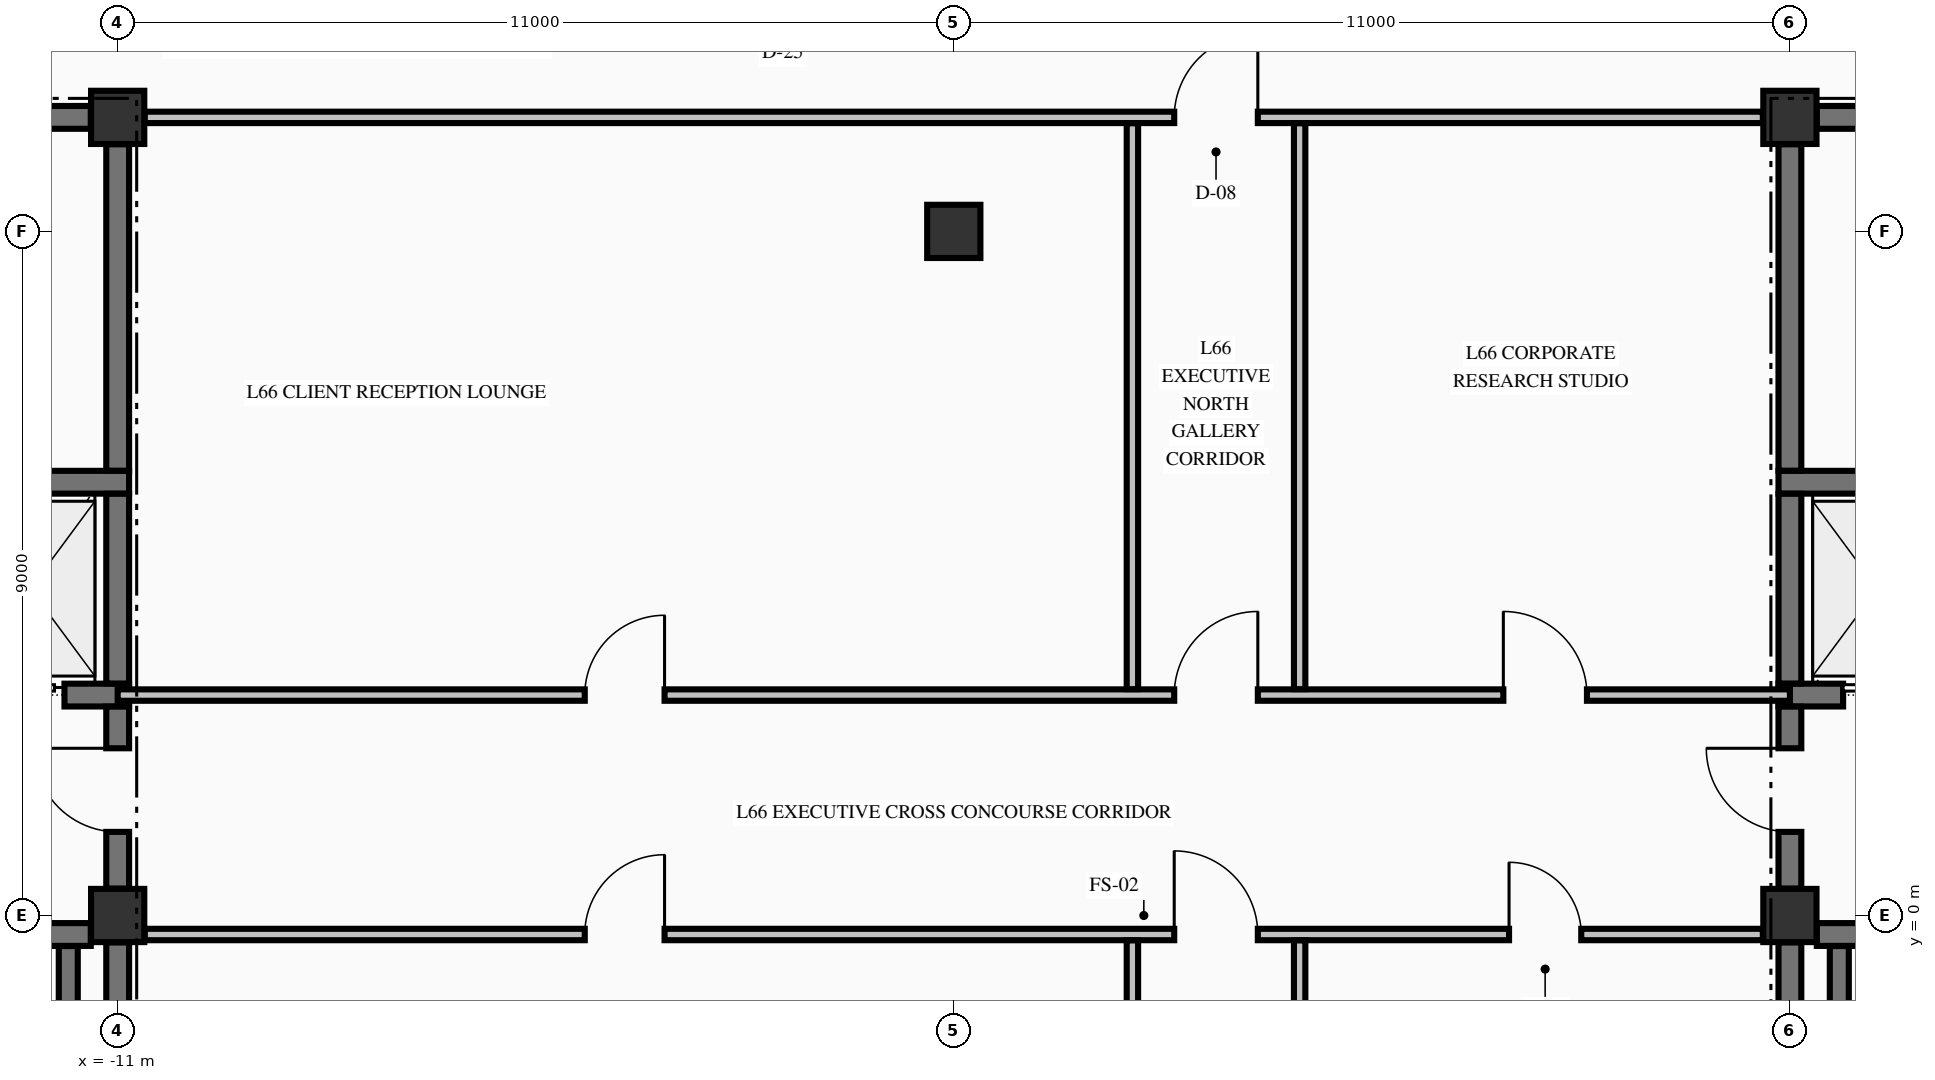
"""IFC4 building model, lengths in metres.
Left out: names, types, materials, properties, quantities, classifications, styles, units other than length and angle.
Written with IfcOpenShell. Run it as: python <this file> out.ifc"""

import sys

from ifc_helpers import new_model, si_unit, direction, frame, frame_2d, origin, origin_2d, place, context, subcontext, project, spatial, rectangle, extrude, element, fill, save


model = new_model("IFC4")
c1 = context("Model", 3, precision=1e-05, world=origin(), true_north=direction((0.0, 1.0)))
c2 = subcontext(c1, "Body", "Model", "MODEL_VIEW")
j1 = project(units=[si_unit("LENGTHUNIT", "METRE"), si_unit("PLANEANGLEUNIT", "RADIAN")], contexts=[c1])
p1 = place(None, origin())
s1 = spatial("IfcSite", under=j1, at=p1, CompositionType="ELEMENT")
p2 = place(p1, origin())
s2 = spatial("IfcBuilding", under=s1, at=p2, CompositionType="ELEMENT")
p3 = place(p2, frame((0.0, 0.0, 249.43)))
s3 = spatial("IfcBuildingStorey", under=s2, at=p3, CompositionType="ELEMENT", Elevation=249.43)
for number, where, z_axis, x_axis in (
    (1, (-11.0, 0.0, -0.425), (0.0, 0.0, 1.0), (1.0, 0.0, 0.0)),
    (2, (-11.0, 10.5, -0.425), (0.0, 0.0, 1.0), (1.0, 0.0, 0.0)),
    (3, (11.0, 0.0, -0.425), (0.0, 0.0, 1.0), (1.0, 0.0, 0.0)),
    (4, (11.0, 10.5, -0.425), (0.0, 0.0, 1.0), (1.0, 0.0, 0.0)),
    (5, (0.0, 9.0, -0.425), (0.0, 0.0, 1.0), (1.0, 0.0, 0.0)),
):
    element("IfcColumn", number, at=place(p3, frame(where, z_axis=z_axis, x_axis=x_axis)), inside=s3, PredefinedType="COLUMN", context=c2, shape_type="SweptSolid", body=[
        extrude(rectangle(XDim=0.7, YDim=0.7, at=origin_2d()), origin(), (0.0, 0.0, 1.0), 5.0),
    ])
p4 = place(p3, frame((-20.571, -0.25, 0.0), z_axis=(0.0, 0.0, 1.0), x_axis=(1.0, 0.0, 0.0)))
e6 = element("IfcWall", 6, at=p4, inside=s3, PredefinedType="SHEAR", context=c2, shape_type="SweptSolid", body=[
    extrude(rectangle(XDim=9.217, YDim=0.3, at=frame_2d((4.608, 0.0))), origin(), (0.0, 0.0, 1.0), 4.575),
])
p5 = place(p4, frame((6.871, 0.0, 0.0)))
e7 = element("IfcOpeningElement", 7, at=p5, cuts=e6, PredefinedType="OPENING", context=c2, shape_type="SweptSolid", body=[
    extrude(rectangle(XDim=1.1, YDim=2.15, at=frame_2d((0.55, 1.075))), frame((0.0, 0.16, 0.0), z_axis=(0.0, -1.0, 0.0), x_axis=(1.0, 0.0, 0.0)), (0.0, 0.0, 1.0), 0.32),
])
p6 = place(p3, frame((11.354, -0.25, 0.0), z_axis=(0.0, 0.0, 1.0), x_axis=(1.0, 0.0, 0.0)))
e8 = element("IfcWall", 8, at=p6, inside=s3, PredefinedType="SHEAR", context=c2, shape_type="SweptSolid", body=[
    extrude(rectangle(XDim=3.521, YDim=0.3, at=frame_2d((1.76, 0.0))), origin(), (0.0, 0.0, 1.0), 4.575),
])
p7 = place(p6, frame((1.246, 0.0, 0.0)))
e9 = element("IfcOpeningElement", 9, at=p7, cuts=e8, PredefinedType="OPENING", context=c2, shape_type="SweptSolid", body=[
    extrude(rectangle(XDim=1.1, YDim=2.15, at=frame_2d((0.55, 1.075))), frame((0.0, 0.16, 0.0), z_axis=(0.0, -1.0, 0.0), x_axis=(1.0, 0.0, 0.0)), (0.0, 0.0, 1.0), 0.32),
])
p8 = place(p3, frame((-14.875, 2.9, 0.0), z_axis=(0.0, 0.0, 1.0), x_axis=(1.0, 0.0, 0.0)))
e10 = element("IfcWall", 10, at=p8, inside=s3, PredefinedType="SHEAR", context=c2, shape_type="SweptSolid", body=[
    extrude(rectangle(XDim=4.025, YDim=0.3, at=frame_2d((2.012, 0.0))), origin(), (0.0, 0.0, 1.0), 4.575),
])
p9 = place(p8, frame((2.075, 0.0, 0.0)))
e11 = element("IfcOpeningElement", 11, at=p9, cuts=e10, PredefinedType="OPENING", context=c2, shape_type="SweptSolid", body=[
    extrude(rectangle(XDim=1.1, YDim=2.2, at=frame_2d((0.55, 1.1))), frame((0.0, 0.16, 0.0), z_axis=(0.0, -1.0, 0.0), x_axis=(1.0, 0.0, 0.0)), (0.0, 0.0, 1.0), 0.32),
])
p10 = place(p3, frame((10.85, 2.9, 0.0), z_axis=(0.0, 0.0, 1.0), x_axis=(1.0, 0.0, 0.0)))
e12 = element("IfcWall", 12, at=p10, inside=s3, PredefinedType="SHEAR", context=c2, shape_type="SweptSolid", body=[
    extrude(rectangle(XDim=4.025, YDim=0.3, at=frame_2d((2.012, 0.0))), origin(), (0.0, 0.0, 1.0), 4.575),
])
p11 = place(p10, frame((0.85, 0.0, 0.0)))
e13 = element("IfcOpeningElement", 13, at=p11, cuts=e12, PredefinedType="OPENING", context=c2, shape_type="SweptSolid", body=[
    extrude(rectangle(XDim=1.1, YDim=2.2, at=frame_2d((0.55, 1.1))), frame((0.0, 0.16, 0.0), z_axis=(0.0, -1.0, 0.0), x_axis=(1.0, 0.0, 0.0)), (0.0, 0.0, 1.0), 0.32),
])
for number, where, z_axis, x_axis in (
    (14, (-14.875, 5.7, 0.0), (0.0, 0.0, 1.0), (1.0, 0.0, 0.0)),
    (15, (10.85, 5.7, 0.0), (0.0, 0.0, 1.0), (1.0, 0.0, 0.0)),
):
    element("IfcWall", number, at=place(p3, frame(where, z_axis=z_axis, x_axis=x_axis)), inside=s3, PredefinedType="SHEAR", context=c2, shape_type="SweptSolid", body=[
        extrude(rectangle(XDim=4.025, YDim=0.3, at=frame_2d((2.012, 0.0))), origin(), (0.0, 0.0, 1.0), 4.575),
    ])
p12 = place(p3, frame((-14.7, 10.5, 0.0), z_axis=(0.0, 0.0, 1.0), x_axis=(1.0, 0.0, 0.0)))
e16 = element("IfcWall", 16, at=p12, inside=s3, PredefinedType="SHEAR", context=c2, shape_type="SweptSolid", body=[
    extrude(rectangle(XDim=3.346, YDim=0.3, at=frame_2d((1.673, 0.0))), origin(), (0.0, 0.0, 1.0), 4.575),
])
p13 = place(p12, frame((0.775, 0.0, 0.0)))
e17 = element("IfcOpeningElement", 17, at=p13, cuts=e16, PredefinedType="OPENING", context=c2, shape_type="SweptSolid", body=[
    extrude(rectangle(XDim=0.95, YDim=2.15, at=frame_2d((0.475, 1.075))), frame((0.0, 0.16, 0.0), z_axis=(0.0, -1.0, 0.0), x_axis=(1.0, 0.0, 0.0)), (0.0, 0.0, 1.0), 0.32),
])
p14 = place(p3, frame((11.354, 10.5, 0.0), z_axis=(0.0, 0.0, 1.0), x_axis=(1.0, 0.0, 0.0)))
e18 = element("IfcWall", 18, at=p14, inside=s3, PredefinedType="SHEAR", context=c2, shape_type="SweptSolid", body=[
    extrude(rectangle(XDim=3.346, YDim=0.3, at=frame_2d((1.673, 0.0))), origin(), (0.0, 0.0, 1.0), 4.575),
])
p15 = place(p14, frame((1.621, 0.0, 0.0)))
e19 = element("IfcOpeningElement", 19, at=p15, cuts=e18, PredefinedType="OPENING", context=c2, shape_type="SweptSolid", body=[
    extrude(rectangle(XDim=0.95, YDim=2.15, at=frame_2d((0.475, 1.075))), frame((0.0, 0.16, 0.0), z_axis=(0.0, -1.0, 0.0), x_axis=(1.0, 0.0, 0.0)), (0.0, 0.0, 1.0), 0.32),
])
p16 = place(p3, frame((-10.644, -0.25, 0.0), z_axis=(0.0, 0.0, 1.0), x_axis=(1.0, 0.0, 0.0)))
e20 = element("IfcWall", 20, at=p16, inside=s3, PredefinedType="PARTITIONING", context=c2, shape_type="SweptSolid", body=[
    extrude(rectangle(XDim=21.288, YDim=0.15, at=frame_2d((10.644, 0.0))), origin(), (0.0, 0.0, 1.0), 4.575),
])
p17 = place(p16, frame((13.544, 0.0, 0.0)))
e21 = element("IfcOpeningElement", 21, at=p17, cuts=e20, PredefinedType="OPENING", context=c2, shape_type="SweptSolid", body=[
    extrude(rectangle(XDim=1.1, YDim=2.15, at=frame_2d((0.55, 1.075))), frame((0.0, 0.085, 0.0), z_axis=(0.0, -1.0, 0.0), x_axis=(1.0, 0.0, 0.0)), (0.0, 0.0, 1.0), 0.17),
])
p18 = place(p16, frame((5.789, 0.0, 0.0)))
e22 = element("IfcOpeningElement", 22, at=p18, cuts=e20, PredefinedType="OPENING", context=c2, shape_type="SweptSolid", body=[
    extrude(rectangle(XDim=1.05, YDim=2.15, at=frame_2d((0.525, 1.075))), frame((0.0, 0.085, 0.0), z_axis=(0.0, -1.0, 0.0), x_axis=(1.0, 0.0, 0.0)), (0.0, 0.0, 1.0), 0.17),
])
p19 = place(p16, frame((17.949, 0.0, 0.0)))
e23 = element("IfcOpeningElement", 23, at=p19, cuts=e20, PredefinedType="OPENING", context=c2, shape_type="SweptSolid", body=[
    extrude(rectangle(XDim=0.95, YDim=2.15, at=frame_2d((0.475, 1.075))), frame((0.0, 0.085, 0.0), z_axis=(0.0, -1.0, 0.0), x_axis=(1.0, 0.0, 0.0)), (0.0, 0.0, 1.0), 0.17),
])
p20 = place(p3, frame((-11.0, 2.9, 0.0), z_axis=(0.0, 0.0, 1.0), x_axis=(1.0, 0.0, 0.0)))
e24 = element("IfcWall", 24, at=p20, inside=s3, PredefinedType="PARTITIONING", context=c2, shape_type="SweptSolid", body=[
    extrude(rectangle(XDim=22.0, YDim=0.15, at=frame_2d((11.0, 0.0))), origin(), (0.0, 0.0, 1.0), 4.575),
])
p21 = place(p20, frame((13.9, 0.0, 0.0)))
e25 = element("IfcOpeningElement", 25, at=p21, cuts=e24, PredefinedType="OPENING", context=c2, shape_type="SweptSolid", body=[
    extrude(rectangle(XDim=1.1, YDim=2.15, at=frame_2d((0.55, 1.075))), frame((0.0, 0.085, 0.0), z_axis=(0.0, -1.0, 0.0), x_axis=(1.0, 0.0, 0.0)), (0.0, 0.0, 1.0), 0.17),
])
p22 = place(p20, frame((6.145, 0.0, 0.0)))
e26 = element("IfcOpeningElement", 26, at=p22, cuts=e24, PredefinedType="OPENING", context=c2, shape_type="SweptSolid", body=[
    extrude(rectangle(XDim=1.05, YDim=2.15, at=frame_2d((0.525, 1.075))), frame((0.0, 0.085, 0.0), z_axis=(0.0, -1.0, 0.0), x_axis=(1.0, 0.0, 0.0)), (0.0, 0.0, 1.0), 0.17),
])
p23 = place(p20, frame((18.23, 0.0, 0.0)))
e27 = element("IfcOpeningElement", 27, at=p23, cuts=e24, PredefinedType="OPENING", context=c2, shape_type="SweptSolid", body=[
    extrude(rectangle(XDim=1.1, YDim=2.15, at=frame_2d((0.55, 1.075))), frame((0.0, 0.085, 0.0), z_axis=(0.0, -1.0, 0.0), x_axis=(1.0, 0.0, 0.0)), (0.0, 0.0, 1.0), 0.17),
])
p24 = place(p3, frame((-10.644, 10.5, 0.0), z_axis=(0.0, 0.0, 1.0), x_axis=(1.0, 0.0, 0.0)))
e28 = element("IfcWall", 28, at=p24, inside=s3, PredefinedType="PARTITIONING", context=c2, shape_type="SweptSolid", body=[
    extrude(rectangle(XDim=21.288, YDim=0.15, at=frame_2d((10.644, 0.0))), origin(), (0.0, 0.0, 1.0), 4.575),
])
p25 = place(p24, frame((13.544, 0.0, 0.0)))
e29 = element("IfcOpeningElement", 29, at=p25, cuts=e28, PredefinedType="OPENING", context=c2, shape_type="SweptSolid", body=[
    extrude(rectangle(XDim=1.1, YDim=2.15, at=frame_2d((0.55, 1.075))), frame((0.0, 0.085, 0.0), z_axis=(0.0, -1.0, 0.0), x_axis=(1.0, 0.0, 0.0)), (0.0, 0.0, 1.0), 0.17),
])
p26 = place(p3, frame((-11.65, -9.798, 0.0), z_axis=(0.0, 0.0, 1.0), x_axis=(0.0, 1.0, 0.0)))
e30 = element("IfcWall", 30, at=p26, inside=s3, PredefinedType="SOLIDWALL", context=c2, shape_type="SweptSolid", body=[
    extrude(rectangle(XDim=9.396, YDim=0.25, at=frame_2d((4.698, 0.0))), origin(), (0.0, 0.0, 1.0), 4.575),
])
p27 = place(p3, frame((-11.0, -9.596, 0.0), z_axis=(0.0, 0.0, 1.0), x_axis=(0.0, 1.0, 0.0)))
e31 = element("IfcWall", 31, at=p27, inside=s3, PredefinedType="SHEAR", context=c2, shape_type="SweptSolid", body=[
    extrude(rectangle(XDim=9.242, YDim=0.3, at=frame_2d((4.621, 0.0))), origin(), (0.0, 0.0, 1.0), 4.575),
])
p28 = place(p3, frame((-11.0, 0.354, 0.0), z_axis=(0.0, 0.0, 1.0), x_axis=(0.0, 1.0, 0.0)))
e32 = element("IfcWall", 32, at=p28, inside=s3, PredefinedType="SHEAR", context=c2, shape_type="SweptSolid", body=[
    extrude(rectangle(XDim=2.394, YDim=0.3, at=frame_2d((1.197, 0.0))), origin(), (0.0, 0.0, 1.0), 4.575),
])
p29 = place(p28, frame((0.746, 0.0, 0.0)))
e33 = element("IfcOpeningElement", 33, at=p29, cuts=e32, PredefinedType="OPENING", context=c2, shape_type="SweptSolid", body=[
    extrude(rectangle(XDim=1.1, YDim=2.15, at=frame_2d((0.55, 1.075))), frame((0.0, 0.16, 0.0), z_axis=(0.0, -1.0, 0.0), x_axis=(1.0, 0.0, 0.0)), (0.0, 0.0, 1.0), 0.32),
])
p30 = place(p3, frame((-11.0, 3.052, 0.0), z_axis=(0.0, 0.0, 1.0), x_axis=(0.0, 1.0, 0.0)))
e34 = element("IfcWall", 34, at=p30, inside=s3, PredefinedType="SHEAR", context=c2, shape_type="SweptSolid", body=[
    extrude(rectangle(XDim=2.496, YDim=0.3, at=frame_2d((1.248, 0.0))), origin(), (0.0, 0.0, 1.0), 4.575),
])
p31 = place(p3, frame((-11.0, 5.852, 0.0), z_axis=(0.0, 0.0, 1.0), x_axis=(0.0, 1.0, 0.0)))
e35 = element("IfcWall", 35, at=p31, inside=s3, PredefinedType="SHEAR", context=c2, shape_type="SweptSolid", body=[
    extrude(rectangle(XDim=4.294, YDim=0.3, at=frame_2d((2.147, 0.0))), origin(), (0.0, 0.0, 1.0), 4.575),
])
p32 = place(p3, frame((11.0, -9.596, 0.0), z_axis=(0.0, 0.0, 1.0), x_axis=(0.0, 1.0, 0.0)))
e36 = element("IfcWall", 36, at=p32, inside=s3, PredefinedType="SHEAR", context=c2, shape_type="SweptSolid", body=[
    extrude(rectangle(XDim=9.242, YDim=0.3, at=frame_2d((4.621, 0.0))), origin(), (0.0, 0.0, 1.0), 4.575),
])
p33 = place(p3, frame((11.0, 0.354, 0.0), z_axis=(0.0, 0.0, 1.0), x_axis=(0.0, 1.0, 0.0)))
e37 = element("IfcWall", 37, at=p33, inside=s3, PredefinedType="SHEAR", context=c2, shape_type="SweptSolid", body=[
    extrude(rectangle(XDim=2.394, YDim=0.3, at=frame_2d((1.197, 0.0))), origin(), (0.0, 0.0, 1.0), 4.575),
])
p34 = place(p33, frame((0.746, 0.0, 0.0)))
e38 = element("IfcOpeningElement", 38, at=p34, cuts=e37, PredefinedType="OPENING", context=c2, shape_type="SweptSolid", body=[
    extrude(rectangle(XDim=1.1, YDim=2.15, at=frame_2d((0.55, 1.075))), frame((0.0, 0.16, 0.0), z_axis=(0.0, -1.0, 0.0), x_axis=(1.0, 0.0, 0.0)), (0.0, 0.0, 1.0), 0.32),
])
p35 = place(p3, frame((11.0, 3.052, 0.0), z_axis=(0.0, 0.0, 1.0), x_axis=(0.0, 1.0, 0.0)))
e39 = element("IfcWall", 39, at=p35, inside=s3, PredefinedType="SHEAR", context=c2, shape_type="SweptSolid", body=[
    extrude(rectangle(XDim=2.496, YDim=0.3, at=frame_2d((1.248, 0.0))), origin(), (0.0, 0.0, 1.0), 4.575),
])
p36 = place(p3, frame((11.0, 5.852, 0.0), z_axis=(0.0, 0.0, 1.0), x_axis=(0.0, 1.0, 0.0)))
e40 = element("IfcWall", 40, at=p36, inside=s3, PredefinedType="SHEAR", context=c2, shape_type="SweptSolid", body=[
    extrude(rectangle(XDim=4.294, YDim=0.3, at=frame_2d((2.147, 0.0))), origin(), (0.0, 0.0, 1.0), 4.575),
])
p37 = place(p3, frame((11.65, -9.798, 0.0), z_axis=(0.0, 0.0, 1.0), x_axis=(0.0, 1.0, 0.0)))
e41 = element("IfcWall", 41, at=p37, inside=s3, PredefinedType="SOLIDWALL", context=c2, shape_type="SweptSolid", body=[
    extrude(rectangle(XDim=9.396, YDim=0.25, at=frame_2d((4.698, 0.0))), origin(), (0.0, 0.0, 1.0), 4.575),
])
p38 = place(p3, frame((2.35, -9.872, 0.0), z_axis=(0.0, 0.0, 1.0), x_axis=(0.0, 1.0, 0.0)))
e42 = element("IfcWall", 42, at=p38, inside=s3, PredefinedType="PARTITIONING", context=c2, shape_type="SweptSolid", body=[
    extrude(rectangle(XDim=9.544, YDim=0.15, at=frame_2d((4.772, 0.0))), origin(), (0.0, 0.0, 1.0), 4.575),
])
p39 = place(p3, frame((2.35, 2.978, 0.0), z_axis=(0.0, 0.0, 1.0), x_axis=(0.0, 1.0, 0.0)))
e43 = element("IfcWall", 43, at=p39, inside=s3, PredefinedType="PARTITIONING", context=c2, shape_type="SweptSolid", body=[
    extrude(rectangle(XDim=7.444, YDim=0.15, at=frame_2d((3.722, 0.0))), origin(), (0.0, 0.0, 1.0), 4.575),
])
p40 = place(p3, frame((4.55, -4.747, 0.0), z_axis=(0.0, 0.0, 1.0), x_axis=(0.0, 1.0, 0.0)))
e44 = element("IfcWall", 44, at=p40, inside=s3, PredefinedType="PARTITIONING", context=c2, shape_type="SweptSolid", body=[
    extrude(rectangle(XDim=4.419, YDim=0.15, at=frame_2d((2.209, 0.0))), origin(), (0.0, 0.0, 1.0), 4.575),
])
p41 = place(p3, frame((4.55, 2.978, 0.0), z_axis=(0.0, 0.0, 1.0), x_axis=(0.0, 1.0, 0.0)))
e45 = element("IfcWall", 45, at=p41, inside=s3, PredefinedType="PARTITIONING", context=c2, shape_type="SweptSolid", body=[
    extrude(rectangle(XDim=7.444, YDim=0.15, at=frame_2d((3.722, 0.0))), origin(), (0.0, 0.0, 1.0), 4.575),
])
p42 = place(p29, origin())
e46 = element("IfcDoor", 46, at=p42, inside=s3, OperationType="SINGLE_SWING_RIGHT", PredefinedType="DOOR", context=c2, shape_type="SweptSolid", body=[
    extrude(rectangle(XDim=1.1, YDim=2.15, at=frame_2d((0.55, 1.075))), frame((0.0, 0.025, 0.0), z_axis=(0.0, -1.0, 0.0), x_axis=(1.0, 0.0, 0.0)), (0.0, 0.0, 1.0), 0.05),
])
fill(e33, e46)
p43 = place(p9, origin())
e47 = element("IfcDoor", 47, at=p43, inside=s3, OperationType="SLIDING_TO_LEFT", PredefinedType="DOOR", context=c2, shape_type="SweptSolid", body=[
    extrude(rectangle(XDim=1.1, YDim=2.2, at=frame_2d((0.55, 1.1))), frame((0.0, 0.025, 0.0), z_axis=(0.0, -1.0, 0.0), x_axis=(1.0, 0.0, 0.0)), (0.0, 0.0, 1.0), 0.05),
])
fill(e11, e47)
p44 = place(p34, origin())
e48 = element("IfcDoor", 48, at=p44, inside=s3, OperationType="SINGLE_SWING_RIGHT", PredefinedType="DOOR", context=c2, shape_type="SweptSolid", body=[
    extrude(rectangle(XDim=1.1, YDim=2.15, at=frame_2d((0.55, 1.075))), frame((0.0, 0.025, 0.0), z_axis=(0.0, -1.0, 0.0), x_axis=(1.0, 0.0, 0.0)), (0.0, 0.0, 1.0), 0.05),
])
fill(e38, e48)
p45 = place(p11, origin())
e49 = element("IfcDoor", 49, at=p45, inside=s3, OperationType="SLIDING_TO_RIGHT", PredefinedType="DOOR", context=c2, shape_type="SweptSolid", body=[
    extrude(rectangle(XDim=1.1, YDim=2.2, at=frame_2d((0.55, 1.1))), frame((0.0, 0.025, 0.0), z_axis=(0.0, -1.0, 0.0), x_axis=(1.0, 0.0, 0.0)), (0.0, 0.0, 1.0), 0.05),
])
fill(e13, e49)
p46 = place(p25, origin())
e50 = element("IfcDoor", 50, at=p46, inside=s3, OperationType="SINGLE_SWING_RIGHT", PredefinedType="DOOR", context=c2, shape_type="SweptSolid", body=[
    extrude(rectangle(XDim=1.1, YDim=2.15, at=frame_2d((0.55, 1.075))), frame((0.0, 0.025, 0.0), z_axis=(0.0, -1.0, 0.0), x_axis=(1.0, 0.0, 0.0)), (0.0, 0.0, 1.0), 0.05),
])
fill(e29, e50)
p47 = place(p21, origin())
e51 = element("IfcDoor", 51, at=p47, inside=s3, OperationType="SINGLE_SWING_RIGHT", PredefinedType="DOOR", context=c2, shape_type="SweptSolid", body=[
    extrude(rectangle(XDim=1.1, YDim=2.15, at=frame_2d((0.55, 1.075))), frame((0.0, 0.025, 0.0), z_axis=(0.0, -1.0, 0.0), x_axis=(1.0, 0.0, 0.0)), (0.0, 0.0, 1.0), 0.05),
])
fill(e25, e51)
p48 = place(p17, origin())
e52 = element("IfcDoor", 52, at=p48, inside=s3, OperationType="SINGLE_SWING_LEFT", PredefinedType="DOOR", context=c2, shape_type="SweptSolid", body=[
    extrude(rectangle(XDim=1.1, YDim=2.15, at=frame_2d((0.55, 1.075))), frame((0.0, 0.025, 0.0), z_axis=(0.0, -1.0, 0.0), x_axis=(1.0, 0.0, 0.0)), (0.0, 0.0, 1.0), 0.05),
])
fill(e21, e52)
p49 = place(p22, origin())
e53 = element("IfcDoor", 53, at=p49, inside=s3, OperationType="SINGLE_SWING_RIGHT", PredefinedType="DOOR", context=c2, shape_type="SweptSolid", body=[
    extrude(rectangle(XDim=1.05, YDim=2.15, at=frame_2d((0.525, 1.075))), frame((0.0, 0.025, 0.0), z_axis=(0.0, -1.0, 0.0), x_axis=(1.0, 0.0, 0.0)), (0.0, 0.0, 1.0), 0.05),
])
fill(e26, e53)
p50 = place(p23, origin())
e54 = element("IfcDoor", 54, at=p50, inside=s3, OperationType="SINGLE_SWING_LEFT", PredefinedType="DOOR", context=c2, shape_type="SweptSolid", body=[
    extrude(rectangle(XDim=1.1, YDim=2.15, at=frame_2d((0.55, 1.075))), frame((0.0, 0.025, 0.0), z_axis=(0.0, -1.0, 0.0), x_axis=(1.0, 0.0, 0.0)), (0.0, 0.0, 1.0), 0.05),
])
fill(e27, e54)
p51 = place(p18, origin())
e55 = element("IfcDoor", 55, at=p51, inside=s3, OperationType="SINGLE_SWING_RIGHT", PredefinedType="DOOR", context=c2, shape_type="SweptSolid", body=[
    extrude(rectangle(XDim=1.05, YDim=2.15, at=frame_2d((0.525, 1.075))), frame((0.0, 0.025, 0.0), z_axis=(0.0, -1.0, 0.0), x_axis=(1.0, 0.0, 0.0)), (0.0, 0.0, 1.0), 0.05),
])
fill(e22, e55)
p52 = place(p19, origin())
e56 = element("IfcDoor", 56, at=p52, inside=s3, OperationType="SINGLE_SWING_LEFT", PredefinedType="DOOR", context=c2, shape_type="SweptSolid", body=[
    extrude(rectangle(XDim=0.95, YDim=2.15, at=frame_2d((0.475, 1.075))), frame((0.0, 0.025, 0.0), z_axis=(0.0, -1.0, 0.0), x_axis=(1.0, 0.0, 0.0)), (0.0, 0.0, 1.0), 0.05),
])
fill(e23, e56)
save(model, sys.argv[1])
